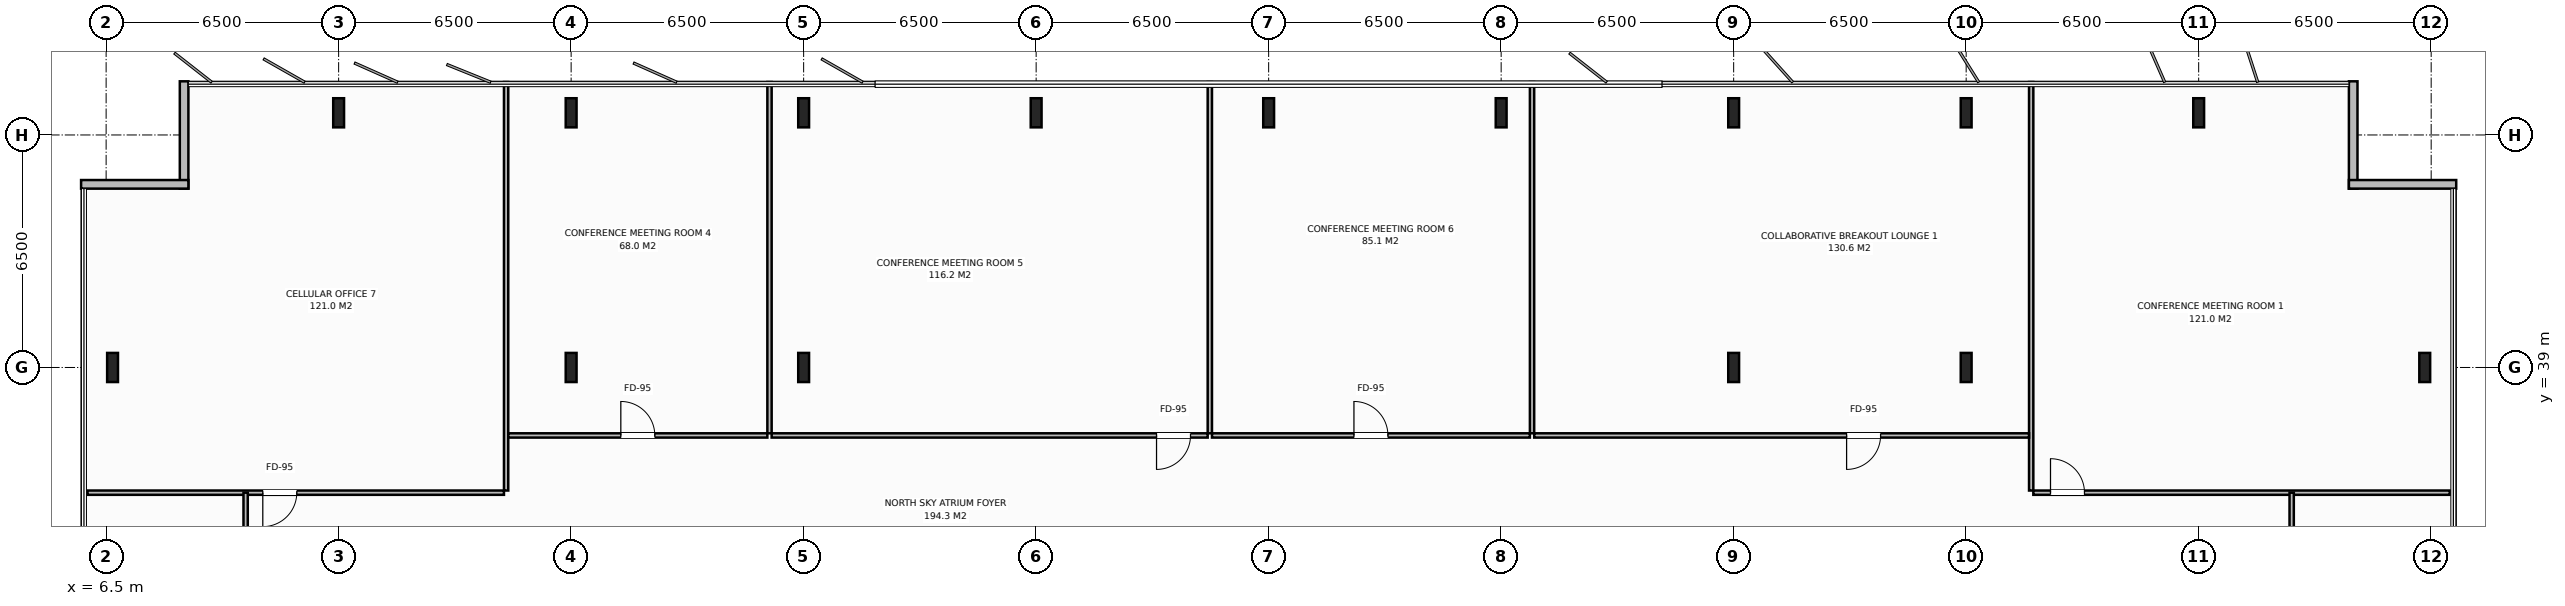
"""IFC4 building model, lengths in metres.
Left out: names, types, materials, properties, quantities, classifications, styles, units other than length and angle.
Written with IfcOpenShell. Run it as: python <this file> out.ifc"""

import sys

from ifc_helpers import new_model, si_unit, direction, frame, frame_2d, origin, origin_2d, place, context, subcontext, project, spatial, rectangle, i_section, extrude, element, fill, save


model = new_model("IFC4")
c1 = context("Model", 3, precision=1e-05, world=origin(), true_north=direction((0.0, 1.0)))
c2 = subcontext(c1, "Body", "Model", "MODEL_VIEW")
j1 = project(units=[si_unit("LENGTHUNIT", "METRE"), si_unit("PLANEANGLEUNIT", "RADIAN")], contexts=[c1])
p1 = place(None, origin())
s1 = spatial("IfcSite", under=j1, at=p1, CompositionType="ELEMENT")
p2 = place(p1, origin())
s2 = spatial("IfcBuilding", under=s1, at=p2, CompositionType="ELEMENT")
p3 = place(p2, frame((0.0, 0.0, 240.4)))
s3 = spatial("IfcBuildingStorey", under=s2, at=p3, CompositionType="ELEMENT", Elevation=240.4)
for number, where, z_axis, x_axis in (
    (1, (19.5, 39.0, 0.0), (0.0, 0.0, 1.0), (1.0, 0.0, 0.0)),
    (2, (58.5, 39.0, 0.0), (0.0, 0.0, 1.0), (1.0, 0.0, 0.0)),
    (3, (26.0, 39.0, 0.0), (0.0, 0.0, 1.0), (1.0, 0.0, 0.0)),
    (4, (52.0, 39.0, 0.0), (0.0, 0.0, 1.0), (1.0, 0.0, 0.0)),
    (5, (13.0, 46.12, 0.0), (0.0, 0.0, 1.0), (1.0, 0.0, 0.0)),
    (6, (19.5, 46.12, 0.0), (0.0, 0.0, 1.0), (1.0, 0.0, 0.0)),
    (7, (26.0, 46.12, 0.0), (0.0, 0.0, 1.0), (1.0, 0.0, 0.0)),
    (8, (32.5, 46.12, 0.0), (0.0, 0.0, 1.0), (1.0, 0.0, 0.0)),
    (9, (39.0, 46.12, 0.0), (0.0, 0.0, 1.0), (1.0, 0.0, 0.0)),
    (10, (45.5, 46.12, 0.0), (0.0, 0.0, 1.0), (1.0, 0.0, 0.0)),
    (11, (52.0, 46.12, 0.0), (0.0, 0.0, 1.0), (1.0, 0.0, 0.0)),
    (12, (58.5, 46.12, 0.0), (0.0, 0.0, 1.0), (1.0, 0.0, 0.0)),
    (13, (65.0, 46.12, 0.0), (0.0, 0.0, 1.0), (1.0, 0.0, 0.0)),
    (14, (6.68, 39.0, 0.0), (0.0, 0.0, 1.0), (1.0, 0.0, 0.0)),
    (15, (71.32, 39.0, 0.0), (0.0, 0.0, 1.0), (1.0, 0.0, 0.0)),
):
    element("IfcColumn", number, at=place(p3, frame(where, z_axis=z_axis, x_axis=x_axis)), inside=s3, PredefinedType="COLUMN", context=c2, shape_type="SweptSolid", body=[
        extrude(i_section(OverallWidth=0.303, OverallDepth=0.814, WebThickness=0.021, FlangeThickness=0.04, at=origin_2d()), origin(), (0.0, 0.0, 1.0), 3.8),
    ])
for number, where, z_axis, x_axis in (
    (16, (8.68, 44.0, 0.0), (0.0, 0.0, 1.0), (0.0, 1.0, 0.0)),
    (17, (5.8, 44.12, 0.0), (0.0, 0.0, 1.0), (1.0, 0.0, 0.0)),
    (18, (69.32, 47.0, 0.0), (0.0, 0.0, 1.0), (0.0, -1.0, 0.0)),
    (19, (69.2, 44.12, 0.0), (0.0, 0.0, 1.0), (1.0, 0.0, 0.0)),
):
    element("IfcWall", number, at=place(p3, frame(where, z_axis=z_axis, x_axis=x_axis)), inside=s3, PredefinedType="STANDARD", context=c2, shape_type="SweptSolid", body=[
        extrude(rectangle(XDim=3.0, YDim=0.24, at=frame_2d((1.5, 0.0))), origin(), (0.0, 0.0, 1.0), 3.58),
    ])
p4 = place(p3, frame((17.682, 35.56, 0.0), z_axis=(0.0, 0.0, 1.0), x_axis=(0.0, 1.0, 0.0)))
e20 = element("IfcWall", 20, at=p4, inside=s3, PredefinedType="PARTITIONING", context=c2, shape_type="SweptSolid", body=[
    extrude(rectangle(XDim=11.42, YDim=0.12, at=frame_2d((5.71, 0.0))), origin(), (0.0, 0.0, 1.0), 3.58),
])
p5 = place(p3, frame((5.98, 35.5, 0.0), z_axis=(0.0, 0.0, 1.0), x_axis=(1.0, 0.0, 0.0)))
e21 = element("IfcWall", 21, at=p5, inside=s3, PredefinedType="PARTITIONING", context=c2, shape_type="SweptSolid", body=[
    extrude(rectangle(XDim=11.642, YDim=0.12, at=frame_2d((5.821, 0.0))), origin(), (0.0, 0.0, 1.0), 3.58),
])
p6 = place(p5, frame((4.9, 0.0, 0.0)))
e22 = element("IfcOpeningElement", 22, at=p6, cuts=e21, PredefinedType="OPENING", context=c2, shape_type="SweptSolid", body=[
    extrude(rectangle(XDim=0.95, YDim=2.15, at=frame_2d((0.475, 1.075))), frame((0.0, 0.07, 0.0), z_axis=(0.0, -1.0, 0.0), x_axis=(1.0, 0.0, 0.0)), (0.0, 0.0, 1.0), 0.14),
])
p7 = place(p3, frame((25.046, 37.16, 0.0), z_axis=(0.0, 0.0, 1.0), x_axis=(0.0, 1.0, 0.0)))
e23 = element("IfcWall", 23, at=p7, inside=s3, PredefinedType="PARTITIONING", context=c2, shape_type="SweptSolid", body=[
    extrude(rectangle(XDim=9.82, YDim=0.12, at=frame_2d((4.91, 0.0))), origin(), (0.0, 0.0, 1.0), 3.58),
])
p8 = place(p3, frame((17.742, 37.1, 0.0), z_axis=(0.0, 0.0, 1.0), x_axis=(1.0, 0.0, 0.0)))
e24 = element("IfcWall", 24, at=p8, inside=s3, PredefinedType="PARTITIONING", context=c2, shape_type="SweptSolid", body=[
    extrude(rectangle(XDim=7.243, YDim=0.12, at=frame_2d((3.622, 0.0))), origin(), (0.0, 0.0, 1.0), 3.58),
])
p9 = place(p8, frame((3.147, 0.0, 0.0)))
e25 = element("IfcOpeningElement", 25, at=p9, cuts=e24, PredefinedType="OPENING", context=c2, shape_type="SweptSolid", body=[
    extrude(rectangle(XDim=0.95, YDim=2.15, at=frame_2d((0.475, 1.075))), frame((0.0, 0.07, 0.0), z_axis=(0.0, -1.0, 0.0), x_axis=(1.0, 0.0, 0.0)), (0.0, 0.0, 1.0), 0.14),
])
p10 = place(p3, frame((37.356, 37.16, 0.0), z_axis=(0.0, 0.0, 1.0), x_axis=(0.0, 1.0, 0.0)))
e26 = element("IfcWall", 26, at=p10, inside=s3, PredefinedType="PARTITIONING", context=c2, shape_type="SweptSolid", body=[
    extrude(rectangle(XDim=9.82, YDim=0.12, at=frame_2d((4.91, 0.0))), origin(), (0.0, 0.0, 1.0), 3.58),
])
p11 = place(p3, frame((25.106, 37.1, 0.0), z_axis=(0.0, 0.0, 1.0), x_axis=(1.0, 0.0, 0.0)))
e27 = element("IfcWall", 27, at=p11, inside=s3, PredefinedType="PARTITIONING", context=c2, shape_type="SweptSolid", body=[
    extrude(rectangle(XDim=12.19, YDim=0.12, at=frame_2d((6.095, 0.0))), origin(), (0.0, 0.0, 1.0), 3.58),
])
p12 = place(p11, frame((10.76, 0.0, 0.0)))
e28 = element("IfcOpeningElement", 28, at=p12, cuts=e27, PredefinedType="OPENING", context=c2, shape_type="SweptSolid", body=[
    extrude(rectangle(XDim=0.95, YDim=2.15, at=frame_2d((0.475, 1.075))), frame((0.0, 0.07, 0.0), z_axis=(0.0, -1.0, 0.0), x_axis=(1.0, 0.0, 0.0)), (0.0, 0.0, 1.0), 0.14),
])
p13 = place(p3, frame((46.364, 37.16, 0.0), z_axis=(0.0, 0.0, 1.0), x_axis=(0.0, 1.0, 0.0)))
e29 = element("IfcWall", 29, at=p13, inside=s3, PredefinedType="PARTITIONING", context=c2, shape_type="SweptSolid", body=[
    extrude(rectangle(XDim=9.82, YDim=0.12, at=frame_2d((4.91, 0.0))), origin(), (0.0, 0.0, 1.0), 3.58),
])
p14 = place(p3, frame((37.416, 37.1, 0.0), z_axis=(0.0, 0.0, 1.0), x_axis=(1.0, 0.0, 0.0)))
e30 = element("IfcWall", 30, at=p14, inside=s3, PredefinedType="PARTITIONING", context=c2, shape_type="SweptSolid", body=[
    extrude(rectangle(XDim=8.888, YDim=0.12, at=frame_2d((4.444, 0.0))), origin(), (0.0, 0.0, 1.0), 3.58),
])
p15 = place(p14, frame((3.969, 0.0, 0.0)))
e31 = element("IfcOpeningElement", 31, at=p15, cuts=e30, PredefinedType="OPENING", context=c2, shape_type="SweptSolid", body=[
    extrude(rectangle(XDim=0.95, YDim=2.15, at=frame_2d((0.475, 1.075))), frame((0.0, 0.07, 0.0), z_axis=(0.0, -1.0, 0.0), x_axis=(1.0, 0.0, 0.0)), (0.0, 0.0, 1.0), 0.14),
])
p16 = place(p3, frame((60.318, 35.56, 0.0), z_axis=(0.0, 0.0, 1.0), x_axis=(0.0, 1.0, 0.0)))
e32 = element("IfcWall", 32, at=p16, inside=s3, PredefinedType="PARTITIONING", context=c2, shape_type="SweptSolid", body=[
    extrude(rectangle(XDim=11.42, YDim=0.12, at=frame_2d((5.71, 0.0))), origin(), (0.0, 0.0, 1.0), 3.58),
])
p17 = place(p3, frame((46.424, 37.1, 0.0), z_axis=(0.0, 0.0, 1.0), x_axis=(1.0, 0.0, 0.0)))
e33 = element("IfcWall", 33, at=p17, inside=s3, PredefinedType="PARTITIONING", context=c2, shape_type="SweptSolid", body=[
    extrude(rectangle(XDim=13.834, YDim=0.12, at=frame_2d((6.917, 0.0))), origin(), (0.0, 0.0, 1.0), 3.58),
])
p18 = place(p17, frame((8.734, 0.0, 0.0)))
e34 = element("IfcOpeningElement", 34, at=p18, cuts=e33, PredefinedType="OPENING", context=c2, shape_type="SweptSolid", body=[
    extrude(rectangle(XDim=0.95, YDim=2.15, at=frame_2d((0.475, 1.075))), frame((0.0, 0.07, 0.0), z_axis=(0.0, -1.0, 0.0), x_axis=(1.0, 0.0, 0.0)), (0.0, 0.0, 1.0), 0.14),
])
p19 = place(p3, frame((60.378, 35.5, 0.0), z_axis=(0.0, 0.0, 1.0), x_axis=(1.0, 0.0, 0.0)))
e35 = element("IfcWall", 35, at=p19, inside=s3, PredefinedType="PARTITIONING", context=c2, shape_type="SweptSolid", body=[
    extrude(rectangle(XDim=11.642, YDim=0.12, at=frame_2d((5.821, 0.0))), origin(), (0.0, 0.0, 1.0), 3.58),
])
p20 = place(p19, frame((0.48, 0.0, 0.0)))
e36 = element("IfcOpeningElement", 36, at=p20, cuts=e35, PredefinedType="OPENING", context=c2, shape_type="SweptSolid", body=[
    extrude(rectangle(XDim=0.95, YDim=2.15, at=frame_2d((0.475, 1.075))), frame((0.0, 0.07, 0.0), z_axis=(0.0, -1.0, 0.0), x_axis=(1.0, 0.0, 0.0)), (0.0, 0.0, 1.0), 0.14),
])
p21 = place(p3, frame((10.4, 16.5, 0.0), z_axis=(0.0, 0.0, 1.0), x_axis=(0.0, 1.0, 0.0)))
e37 = element("IfcWall", 37, at=p21, inside=s3, PredefinedType="PARTITIONING", context=c2, shape_type="SweptSolid", body=[
    extrude(rectangle(XDim=19.0, YDim=0.12, at=frame_2d((9.5, 0.0))), origin(), (0.0, 0.0, 1.0), 3.58),
])
p22 = place(p21, frame((9.025, 0.0, 0.0)))
e38 = element("IfcOpeningElement", 38, at=p22, cuts=e37, PredefinedType="OPENING", context=c2, shape_type="SweptSolid", body=[
    extrude(rectangle(XDim=0.95, YDim=2.15, at=frame_2d((0.475, 1.075))), frame((0.0, 0.07, 0.0), z_axis=(0.0, -1.0, 0.0), x_axis=(1.0, 0.0, 0.0)), (0.0, 0.0, 1.0), 0.14),
])
p23 = place(p3, frame((67.6, 27.05, 0.0), z_axis=(0.0, 0.0, 1.0), x_axis=(0.0, 1.0, 0.0)))
e39 = element("IfcWall", 39, at=p23, inside=s3, PredefinedType="PARTITIONING", context=c2, shape_type="SweptSolid", body=[
    extrude(rectangle(XDim=8.45, YDim=0.12, at=frame_2d((4.225, 0.0))), origin(), (0.0, 0.0, 1.0), 3.58),
])
p24 = place(p23, frame((2.7, 0.0, 0.0)))
e40 = element("IfcOpeningElement", 40, at=p24, cuts=e39, PredefinedType="OPENING", context=c2, shape_type="SweptSolid", body=[
    extrude(rectangle(XDim=0.95, YDim=2.15, at=frame_2d((0.475, 1.075))), frame((0.0, 0.07, 0.0), z_axis=(0.0, -1.0, 0.0), x_axis=(1.0, 0.0, 0.0)), (0.0, 0.0, 1.0), 0.14),
])
p25 = place(p6, origin())
e41 = element("IfcDoor", 41, at=p25, inside=s3, OperationType="SINGLE_SWING_RIGHT", PredefinedType="DOOR", context=c2, shape_type="SweptSolid", body=[
    extrude(rectangle(XDim=0.95, YDim=2.15, at=frame_2d((0.475, 1.075))), frame((0.0, 0.025, 0.0), z_axis=(0.0, -1.0, 0.0), x_axis=(1.0, 0.0, 0.0)), (0.0, 0.0, 1.0), 0.05),
])
fill(e22, e41)
p26 = place(p9, origin())
e42 = element("IfcDoor", 42, at=p26, inside=s3, OperationType="SINGLE_SWING_LEFT", PredefinedType="DOOR", context=c2, shape_type="SweptSolid", body=[
    extrude(rectangle(XDim=0.95, YDim=2.15, at=frame_2d((0.475, 1.075))), frame((0.0, 0.025, 0.0), z_axis=(0.0, -1.0, 0.0), x_axis=(1.0, 0.0, 0.0)), (0.0, 0.0, 1.0), 0.05),
])
fill(e25, e42)
p27 = place(p12, origin())
e43 = element("IfcDoor", 43, at=p27, inside=s3, OperationType="SINGLE_SWING_RIGHT", PredefinedType="DOOR", context=c2, shape_type="SweptSolid", body=[
    extrude(rectangle(XDim=0.95, YDim=2.15, at=frame_2d((0.475, 1.075))), frame((0.0, 0.025, 0.0), z_axis=(0.0, -1.0, 0.0), x_axis=(1.0, 0.0, 0.0)), (0.0, 0.0, 1.0), 0.05),
])
fill(e28, e43)
p28 = place(p15, origin())
e44 = element("IfcDoor", 44, at=p28, inside=s3, OperationType="SINGLE_SWING_LEFT", PredefinedType="DOOR", context=c2, shape_type="SweptSolid", body=[
    extrude(rectangle(XDim=0.95, YDim=2.15, at=frame_2d((0.475, 1.075))), frame((0.0, 0.025, 0.0), z_axis=(0.0, -1.0, 0.0), x_axis=(1.0, 0.0, 0.0)), (0.0, 0.0, 1.0), 0.05),
])
fill(e31, e44)
p29 = place(p18, origin())
e45 = element("IfcDoor", 45, at=p29, inside=s3, OperationType="SINGLE_SWING_RIGHT", PredefinedType="DOOR", context=c2, shape_type="SweptSolid", body=[
    extrude(rectangle(XDim=0.95, YDim=2.15, at=frame_2d((0.475, 1.075))), frame((0.0, 0.025, 0.0), z_axis=(0.0, -1.0, 0.0), x_axis=(1.0, 0.0, 0.0)), (0.0, 0.0, 1.0), 0.05),
])
fill(e34, e45)
p30 = place(p20, origin())
e46 = element("IfcDoor", 46, at=p30, inside=s3, OperationType="SINGLE_SWING_LEFT", PredefinedType="DOOR", context=c2, shape_type="SweptSolid", body=[
    extrude(rectangle(XDim=0.95, YDim=2.15, at=frame_2d((0.475, 1.075))), frame((0.0, 0.025, 0.0), z_axis=(0.0, -1.0, 0.0), x_axis=(1.0, 0.0, 0.0)), (0.0, 0.0, 1.0), 0.05),
])
fill(e36, e46)
save(model, sys.argv[1])
